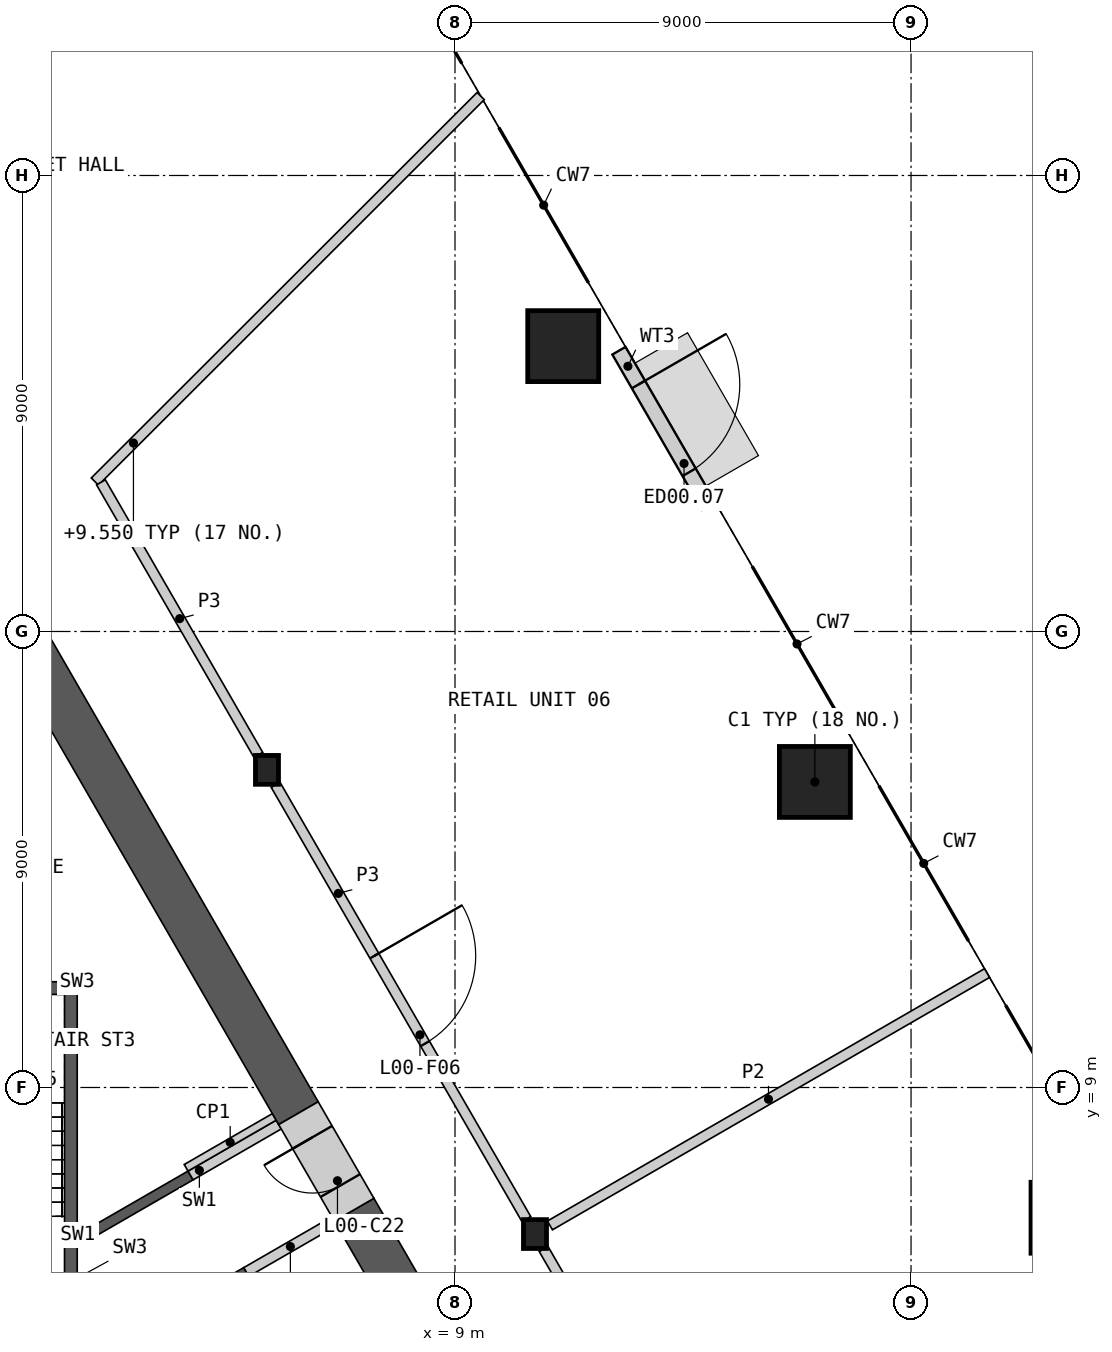
"""IFC4 building model, lengths in metres.
Left out: names, types, materials, properties, quantities, classifications, styles, units other than length and angle.
Written with IfcOpenShell. Run it as: python <this file> out.ifc"""

import sys

from ifc_helpers import new_model, si_unit, direction, frame, frame_2d, origin, origin_2d, place, context, subcontext, project, spatial, polyline, rectangle, hollow_rectangle, i_section, outline, extrude, element, fill, save


model = new_model("IFC4")
c1 = context("Model", 3, precision=1e-05, world=origin(), true_north=direction((0.0, 1.0)))
c2 = subcontext(c1, "Body", "Model", "MODEL_VIEW")
j1 = project(units=[si_unit("LENGTHUNIT", "METRE"), si_unit("PLANEANGLEUNIT", "RADIAN")], contexts=[c1])
p1 = place(None, origin())
s1 = spatial("IfcSite", under=j1, at=p1, CompositionType="ELEMENT")
p2 = place(p1, origin())
s2 = spatial("IfcBuilding", under=s1, at=p2, CompositionType="ELEMENT")
p3 = place(p2, origin())
s3 = spatial("IfcBuildingStorey", under=s2, at=p3, CompositionType="ELEMENT", Elevation=0.0)
for number, where, z_axis, x_axis in (
    (1, (21.068, 6.429, 0.0), (0.0, 0.0, 1.0), (1.0, 0.0, 0.0)),
    (2, (16.102, 15.031, 0.0), (0.0, 0.0, 1.0), (1.0, 0.0, 0.0)),
    (3, (11.136, 23.632, 0.0), (0.0, 0.0, 1.0), (1.0, 0.0, 0.0)),
):
    element("IfcColumn", number, at=place(p3, frame(where, z_axis=z_axis, x_axis=x_axis)), inside=s3, PredefinedType="COLUMN", context=c2, shape_type="SweptSolid", body=[
        extrude(hollow_rectangle(XDim=1.4, YDim=1.4, WallThickness=0.1, at=origin_2d()), origin(), (0.0, 0.0, 1.0), 10.0),
    ])
for number, where, z_axis, x_axis in (
    (4, (10.578, 6.107, 0.0), (0.0, 0.0, 1.0), (1.0, 0.0, 0.0)),
    (5, (5.289, 15.269, 0.0), (0.0, 0.0, 1.0), (1.0, 0.0, 0.0)),
):
    element("IfcColumn", number, at=place(p3, frame(where, z_axis=z_axis, x_axis=x_axis)), inside=s3, PredefinedType="COLUMN", context=c2, shape_type="SweptSolid", body=[
        extrude(i_section(OverallWidth=0.454, OverallDepth=0.57, WebThickness=0.078, FlangeThickness=0.125, at=origin_2d()), origin(), (0.0, 0.0, 1.0), 10.0),
    ])
p4 = place(p3, frame((12.235, 23.542, 0.0), z_axis=(0.0, 0.0, 1.0), x_axis=(0.500011000363, -0.866019052629, 0.0)))
e6 = element("IfcWall", 6, at=p4, inside=s3, PredefinedType="SOLIDWALL", context=c2, shape_type="SweptSolid", body=[
    extrude(rectangle(XDim=3.54, YDim=0.3, at=frame_2d((1.77, 0.0))), origin(), (0.0, 0.0, 1.0), 9.55),
])
p5 = place(p4, frame((0.77, 0.0, 0.0)))
e7 = element("IfcOpeningElement", 7, at=p5, cuts=e6, PredefinedType="OPENING", context=c2, shape_type="SweptSolid", body=[
    extrude(rectangle(XDim=2.0, YDim=3.0, at=frame_2d((1.0, 1.5))), frame((0.0, 0.16, 0.0), z_axis=(0.0, -1.0, 0.0), x_axis=(1.0, 0.0, 0.0)), (0.0, 0.0, 1.0), 0.32),
])
p6 = place(p3, origin())
e8 = element("IfcWall", 8, at=p6, inside=s3, PredefinedType="SHEAR", context=c2, shape_type="SweptSolid", body=[
    extrude(outline(polyline([(1.561, 6.097), (3.731, 7.35), (3.831, 7.177), (1.66, 5.924), (1.561, 6.097)])), origin(), (0.0, 0.0, 1.0), 9.55),
])
p7 = place(p3, origin())
e9 = element("IfcWall", 9, at=p7, inside=s3, PredefinedType="SHEAR", context=c2, shape_type="SweptSolid", body=[
    extrude(outline(polyline([(2.66, 4.192), (4.831, 5.445), (8.231, -0.444), (6.061, -1.697), (5.96, -1.524), (7.952, -0.374), (6.952, 1.358), (4.96, 0.208), (4.861, 0.381), (6.852, 1.531), (5.852, 3.263), (3.861, 2.113), (3.76, 2.287), (5.752, 3.437), (4.752, 5.169), (2.76, 4.019), (2.66, 4.192)])), origin(), (0.0, 0.0, 1.0), 9.55),
])
p8 = place(p3, frame((4.881, 5.358, 0.0), z_axis=(0.0, 0.0, 1.0), x_axis=(0.866035824272, 0.499981950752, 0.0)))
e10 = element("IfcWall", 10, at=p8, inside=s3, PredefinedType="SHEAR", context=c2, shape_type="SweptSolid", body=[
    extrude(rectangle(XDim=2.009, YDim=0.2, at=frame_2d((1.004, 0.0))), origin(), (0.0, 0.0, 1.0), 9.55),
])
p9 = place(p3, frame((3.781, 7.263, 0.0), z_axis=(0.0, 0.0, 1.0), x_axis=(0.865983199114, 0.50007309351, 0.0)))
e11 = element("IfcWall", 11, at=p9, inside=s3, PredefinedType="SHEAR", context=c2, shape_type="SweptSolid", body=[
    extrude(rectangle(XDim=2.009, YDim=0.2, at=frame_2d((1.004, 0.0))), origin(), (0.0, 0.0, 1.0), 9.55),
])
p10 = place(p3, origin())
e12 = element("IfcWall", 12, at=p10, inside=s3, PredefinedType="SHEAR", context=c2, shape_type="SweptSolid", body=[
    extrude(outline(polyline([(1.544, 5.237), (1.544, 11.087), (1.294, 10.837), (1.294, 5.237), (1.544, 5.237)])), origin(), (0.0, 0.0, 1.0), 9.55),
])
p11 = place(p3, origin())
e13 = element("IfcWall", 13, at=p11, inside=s3, PredefinedType="SHEAR", context=c2, shape_type="SweptSolid", body=[
    extrude(outline(polyline([(1.544, 11.087), (-1.544, 11.087), (-1.294, 10.837), (1.294, 10.837), (1.544, 11.087)])), origin(), (0.0, 0.0, 1.0), 9.55),
])
p12 = place(p3, frame((3.693, 7.415, 0.0), z_axis=(0.0, 0.0, 1.0), x_axis=(0.866035824272, 0.499981950752, 0.0)))
e14 = element("IfcWall", 14, at=p12, inside=s3, PredefinedType="PARTITIONING", context=c2, shape_type="SweptSolid", body=[
    extrude(rectangle(XDim=2.009, YDim=0.15, at=frame_2d((1.004, 0.0))), origin(), (0.0, 0.0, 1.0), 9.55),
])
p13 = place(p3, frame((5.91, 8.493, 0.0), z_axis=(0.0, 0.0, 1.0), x_axis=(-0.50000828114, 0.866020622613, 0.0)))
e15 = element("IfcWall", 15, at=p13, inside=s3, PredefinedType="SHEAR", context=c2, shape_type="SweptSolid", body=[
    extrude(rectangle(XDim=11.041, YDim=0.9, at=frame_2d((5.521, 0.0))), origin(), (0.0, 0.0, 1.0), 9.55),
])
p14 = place(p3, frame((8.16, 4.596, 0.0), z_axis=(0.0, 0.0, 1.0), x_axis=(-0.500077740698, 0.865980515519, 0.0)))
e16 = element("IfcWall", 16, at=p14, inside=s3, PredefinedType="SHEAR", context=c2, shape_type="SweptSolid", body=[
    extrude(rectangle(XDim=2.3, YDim=0.9, at=frame_2d((1.15, 0.0))), origin(), (0.0, 0.0, 1.0), 9.55),
])
p15 = place(p3, frame((7.01, 6.588, 0.0), z_axis=(0.0, 0.0, 1.0), x_axis=(-0.499946605688, 0.86605622881, 0.0)))
e17 = element("IfcWall", 17, at=p15, inside=s3, PredefinedType="SHEAR", context=c2, shape_type="SweptSolid", body=[
    extrude(rectangle(XDim=2.2, YDim=0.9, at=frame_2d((1.1, 0.0))), origin(), (0.0, 0.0, 1.0), 9.55),
])
p16 = place(p15, frame((0.55, 0.0, 0.0)))
e18 = element("IfcOpeningElement", 18, at=p16, cuts=e17, PredefinedType="OPENING", context=c2, shape_type="SweptSolid", body=[
    extrude(rectangle(XDim=1.1, YDim=2.1, at=frame_2d((0.55, 1.05))), frame((0.0, 0.46, 0.0), z_axis=(0.0, -1.0, 0.0), x_axis=(1.0, 0.0, 0.0)), (0.0, 0.0, 1.0), 0.92),
])
p17 = place(p3, frame((1.892, 20.959, 0.0), z_axis=(0.0, 0.0, 1.0), x_axis=(0.707390242945, 0.706823205749, 0.0)))
e19 = element("IfcWall", 19, at=p17, inside=s3, PredefinedType="PARTITIONING", context=c2, shape_type="SweptSolid", body=[
    extrude(rectangle(XDim=10.764, YDim=0.2, at=frame_2d((5.382, 0.0))), origin(), (0.0, 0.0, 1.0), 9.55),
])
p18 = place(p3, frame((10.749, 5.813, 0.0), z_axis=(0.0, 0.0, 1.0), x_axis=(0.500004292778, -0.866022925334, 0.0)))
e20 = element("IfcWall", 20, at=p18, inside=s3, PredefinedType="PARTITIONING", context=c2, shape_type="SweptSolid", body=[
    extrude(rectangle(XDim=9.898, YDim=0.2, at=frame_2d((4.949, 0.0))), origin(), (0.0, 0.0, 1.0), 9.55),
])
p19 = place(p18, frame((3.898, 0.0, 0.0)))
e21 = element("IfcOpeningElement", 21, at=p19, cuts=e20, PredefinedType="OPENING", context=c2, shape_type="SweptSolid", body=[
    extrude(rectangle(XDim=2.0, YDim=2.1, at=frame_2d((1.0, 1.05))), frame((0.0, 0.11, 0.0), z_axis=(0.0, -1.0, 0.0), x_axis=(1.0, 0.0, 0.0)), (0.0, 0.0, 1.0), 0.22),
])
p20 = place(p3, frame((5.459, 14.974, 0.0), z_axis=(0.0, 0.0, 1.0), x_axis=(0.499985793049, -0.866033606016, 0.0)))
e22 = element("IfcWall", 22, at=p20, inside=s3, PredefinedType="PARTITIONING", context=c2, shape_type="SweptSolid", body=[
    extrude(rectangle(XDim=9.898, YDim=0.2, at=frame_2d((4.949, 0.0))), origin(), (0.0, 0.0, 1.0), 9.55),
])
p21 = place(p20, frame((3.898, 0.0, 0.0)))
e23 = element("IfcOpeningElement", 23, at=p21, cuts=e22, PredefinedType="OPENING", context=c2, shape_type="SweptSolid", body=[
    extrude(rectangle(XDim=2.0, YDim=2.1, at=frame_2d((1.0, 1.05))), frame((0.0, 0.11, 0.0), z_axis=(0.0, -1.0, 0.0), x_axis=(1.0, 0.0, 0.0)), (0.0, 0.0, 1.0), 0.22),
])
p22 = place(p3, frame((2.013, 20.943, 0.0), z_axis=(0.0, 0.0, 1.0), x_axis=(0.500015016532, -0.866016733812, 0.0)))
e24 = element("IfcWall", 24, at=p22, inside=s3, PredefinedType="PARTITIONING", context=c2, shape_type="SweptSolid", body=[
    extrude(rectangle(XDim=6.212, YDim=0.2, at=frame_2d((3.106, 0.0))), origin(), (0.0, 0.0, 1.0), 9.55),
])
p23 = place(p3, frame((10.873, 6.278, 0.0), z_axis=(0.0, 0.0, 1.0), x_axis=(0.866021920282, 0.500006033555, 0.0)))
e25 = element("IfcWall", 25, at=p23, inside=s3, PredefinedType="PARTITIONING", context=c2, shape_type="SweptSolid", body=[
    extrude(rectangle(XDim=9.961, YDim=0.2, at=frame_2d((4.981, 0.0))), origin(), (0.0, 0.0, 1.0), 9.55),
])
p24 = place(p5, origin())
e26 = element("IfcDoor", 26, at=p24, inside=s3, OperationType="DOUBLE_DOOR_SINGLE_SWING", PredefinedType="DOOR", context=c2, shape_type="SweptSolid", body=[
    extrude(rectangle(XDim=2.0, YDim=3.0, at=frame_2d((1.0, 1.5))), frame((0.0, 0.025, 0.0), z_axis=(0.0, -1.0, 0.0), x_axis=(1.0, 0.0, 0.0)), (0.0, 0.0, 1.0), 0.05),
])
fill(e7, e26)
p25 = place(p16, origin())
e27 = element("IfcDoor", 27, at=p25, inside=s3, OperationType="SINGLE_SWING_RIGHT", PredefinedType="DOOR", context=c2, shape_type="SweptSolid", body=[
    extrude(rectangle(XDim=1.1, YDim=2.1, at=frame_2d((0.55, 1.05))), frame((0.0, 0.205, 0.0), z_axis=(0.0, -1.0, 0.0), x_axis=(1.0, 0.0, 0.0)), (0.0, 0.0, 1.0), 0.05),
])
fill(e18, e27)
p26 = place(p21, origin())
e28 = element("IfcDoor", 28, at=p26, inside=s3, OperationType="DOUBLE_DOOR_SINGLE_SWING", PredefinedType="DOOR", context=c2, shape_type="SweptSolid", body=[
    extrude(rectangle(XDim=2.0, YDim=2.1, at=frame_2d((1.0, 1.05))), frame((0.0, 0.025, 0.0), z_axis=(0.0, -1.0, 0.0), x_axis=(1.0, 0.0, 0.0)), (0.0, 0.0, 1.0), 0.05),
])
fill(e23, e28)
save(model, sys.argv[1])
